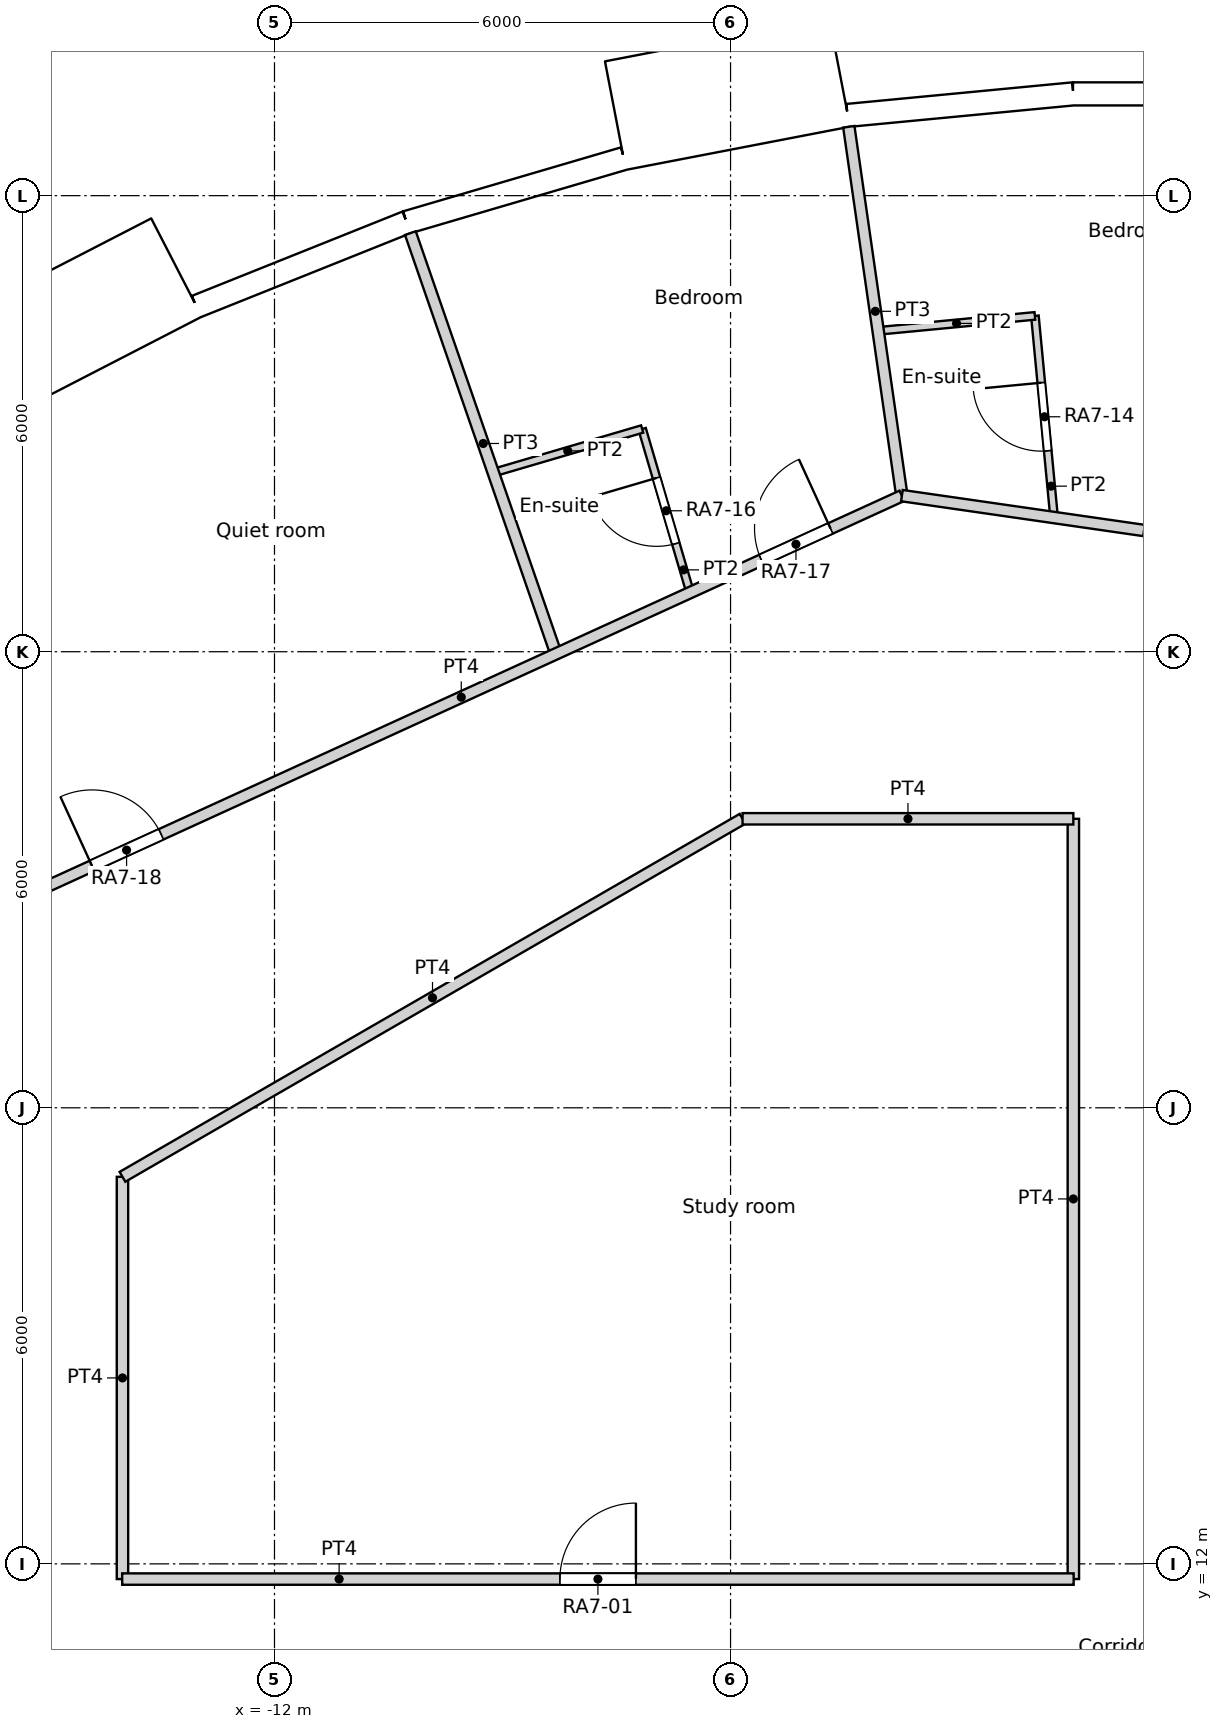
"""IFC4 building model, lengths in metres.
Left out: names, types, materials, properties, quantities, classifications, styles, units other than length and angle.
Written with IfcOpenShell. Run it as: python <this file> out.ifc"""

import sys

from ifc_helpers import new_model, si_unit, direction, frame, frame_2d, origin, origin_2d, place, context, subcontext, project, spatial, rectangle, circle, extrude, element, fill, save


model = new_model("IFC4")
c1 = context("Model", 3, precision=1e-05, world=origin(), true_north=direction((0.0, 1.0)))
c2 = subcontext(c1, "Body", "Model", "MODEL_VIEW")
j1 = project(units=[si_unit("LENGTHUNIT", "METRE"), si_unit("PLANEANGLEUNIT", "RADIAN")], contexts=[c1])
p1 = place(None, origin())
s1 = spatial("IfcSite", under=j1, at=p1, CompositionType="ELEMENT")
p2 = place(p1, origin())
s2 = spatial("IfcBuilding", under=s1, at=p2, CompositionType="ELEMENT")
p3 = place(p2, frame((0.0, 0.0, 93.0)))
s3 = spatial("IfcBuildingStorey", under=s2, at=p3, CompositionType="ELEMENT", Elevation=93.0)
for number, where, z_axis, x_axis in (
    (1, (-4.309, 29.966, 0.0), (0.0, 0.0, 1.0), (1.0, 0.0, 0.0)),
    (2, (-9.902, 28.61, 0.0), (0.0, 0.0, 1.0), (1.0, 0.0, 0.0)),
    (3, (-15.137, 26.219, 0.0), (0.0, 0.0, 1.0), (1.0, 0.0, 0.0)),
):
    element("IfcColumn", number, at=place(p3, frame(where, z_axis=z_axis, x_axis=x_axis)), inside=s3, PredefinedType="COLUMN", context=c2, shape_type="SweptSolid", body=[
        extrude(circle(Radius=0.6, at=origin_2d()), origin(), (0.0, 0.0, 1.0), 3.6),
    ])
for number, where, z_axis, x_axis in (
    (4, (-1.427, 24.506, 0.0), (0.0, 0.0, 1.0), (1.0, 0.0, 0.0)),
    (5, (-7.04, 23.516, 0.0), (0.0, 0.0, 1.0), (1.0, 0.0, 0.0)),
    (6, (-12.274, 21.259, 0.0), (0.0, 0.0, 1.0), (1.0, 0.0, 0.0)),
):
    element("IfcColumn", number, at=place(p3, frame(where, z_axis=z_axis, x_axis=x_axis)), inside=s3, PredefinedType="COLUMN", context=c2, shape_type="SweptSolid", body=[
        extrude(circle(Radius=0.65, at=origin_2d()), origin(), (0.0, 0.0, 1.0), 3.6),
    ])
for number, where, z_axis, x_axis in (
    (7, (-4.188, 18.35, 0.0), (0.0, 0.0, 1.0), (1.0, 0.0, 0.0)),
    (8, (-9.411, 16.301, 0.0), (0.0, 0.0, 1.0), (1.0, 0.0, 0.0)),
    (9, (-13.798, 12.802, 0.0), (0.0, 0.0, 1.0), (1.0, 0.0, 0.0)),
):
    element("IfcColumn", number, at=place(p3, frame(where, z_axis=z_axis, x_axis=x_axis)), inside=s3, PredefinedType="COLUMN", context=c2, shape_type="SweptSolid", body=[
        extrude(circle(Radius=0.7, at=origin_2d()), origin(), (0.0, 0.0, 1.0), 3.6),
    ])
p4 = place(p3, frame((1.487, 31.339, 0.0), z_axis=(0.0, 0.0, 1.0), x_axis=(-1.0, 0.0, 0.0)))
e10 = element("IfcWall", 10, at=p4, inside=s3, PredefinedType="SOLIDWALL", context=c2, shape_type="SweptSolid", body=[
    extrude(rectangle(XDim=2.98, YDim=0.3, at=frame_2d((1.49, 0.0))), origin(), (0.0, 0.0, 1.0), 3.15),
])
p5 = place(p4, frame((1.49, 0.0, 1.55)))
e11 = element("IfcOpeningElement", 11, at=p5, cuts=e10, PredefinedType="OPENING", context=c2, shape_type="SweptSolid", body=[
    extrude(circle(Radius=0.9, at=origin_2d()), frame((0.0, 0.16, 0.0), z_axis=(0.0, -1.0, 0.0), x_axis=(1.0, 0.0, 0.0)), (0.0, 0.0, 1.0), 0.32),
])
p6 = place(p3, frame((-1.493, 31.339, 0.0), z_axis=(0.0, 0.0, 1.0), x_axis=(-0.995472611385, -0.095048829468, 0.0)))
e12 = element("IfcWall", 12, at=p6, inside=s3, PredefinedType="SOLIDWALL", context=c2, shape_type="SweptSolid", body=[
    extrude(rectangle(XDim=2.979, YDim=0.3, at=frame_2d((1.49, 0.0))), origin(), (0.0, 0.0, 1.0), 3.15),
])
p7 = place(p6, frame((1.49, 0.0, 1.55)))
e13 = element("IfcOpeningElement", 13, at=p7, cuts=e12, PredefinedType="OPENING", context=c2, shape_type="SweptSolid", body=[
    extrude(circle(Radius=0.9, at=origin_2d()), frame((0.0, 0.16, 0.0), z_axis=(0.0, -1.0, 0.0), x_axis=(1.0, 0.0, 0.0)), (0.0, 0.0, 1.0), 0.32),
])
p8 = place(p3, frame((-4.567, 31.621, -0.45), z_axis=(0.0, 0.0, 1.0), x_axis=(-0.981921602273, -0.189288052949, 0.0)))
e14 = element("IfcWall", 14, at=p8, inside=s3, PredefinedType="ELEMENTEDWALL", context=c2, shape_type="SweptSolid", body=[
    extrude(rectangle(XDim=3.0, YDim=1.45, at=frame_2d((1.5, 0.0))), origin(), (0.0, 0.0, 1.0), 3.6),
])
p9 = place(p8, frame((1.5, 0.0, 2.0)))
e15 = element("IfcOpeningElement", 15, at=p9, cuts=e14, PredefinedType="OPENING", context=c2, shape_type="SweptSolid", body=[
    extrude(circle(Radius=0.9, at=origin_2d()), frame((0.0, 0.735, 0.0), z_axis=(0.0, -1.0, 0.0), x_axis=(1.0, 0.0, 0.0)), (0.0, 0.0, 1.0), 1.47),
])
p10 = place(p3, frame((-7.403, 30.488, 0.0), z_axis=(0.0, 0.0, 1.0), x_axis=(-0.959501085144, -0.281704930036, 0.0)))
e16 = element("IfcWall", 16, at=p10, inside=s3, PredefinedType="SOLIDWALL", context=c2, shape_type="SweptSolid", body=[
    extrude(rectangle(XDim=2.979, YDim=0.3, at=frame_2d((1.49, 0.0))), origin(), (0.0, 0.0, 1.0), 3.15),
])
p11 = place(p10, frame((1.49, 0.0, 1.55)))
e17 = element("IfcOpeningElement", 17, at=p11, cuts=e16, PredefinedType="OPENING", context=c2, shape_type="SweptSolid", body=[
    extrude(circle(Radius=0.9, at=origin_2d()), frame((0.0, 0.16, 0.0), z_axis=(0.0, -1.0, 0.0), x_axis=(1.0, 0.0, 0.0)), (0.0, 0.0, 1.0), 0.32),
])
p12 = place(p3, frame((-10.261, 29.649, 0.0), z_axis=(0.0, 0.0, 1.0), x_axis=(-0.928374947, -0.371644935098, 0.0)))
e18 = element("IfcWall", 18, at=p12, inside=s3, PredefinedType="SOLIDWALL", context=c2, shape_type="SweptSolid", body=[
    extrude(rectangle(XDim=2.98, YDim=0.3, at=frame_2d((1.49, 0.0))), origin(), (0.0, 0.0, 1.0), 3.15),
])
p13 = place(p12, frame((1.49, 0.0, 1.55)))
e19 = element("IfcOpeningElement", 19, at=p13, cuts=e18, PredefinedType="OPENING", context=c2, shape_type="SweptSolid", body=[
    extrude(circle(Radius=0.9, at=origin_2d()), frame((0.0, 0.16, 0.0), z_axis=(0.0, -1.0, 0.0), x_axis=(1.0, 0.0, 0.0)), (0.0, 0.0, 1.0), 0.32),
])
p14 = place(p3, frame((-13.291, 29.053, -0.45), z_axis=(0.0, 0.0, 1.0), x_axis=(-0.888858064689, -0.458182650083, 0.0)))
e20 = element("IfcWall", 20, at=p14, inside=s3, PredefinedType="ELEMENTEDWALL", context=c2, shape_type="SweptSolid", body=[
    extrude(rectangle(XDim=3.0, YDim=1.45, at=frame_2d((1.5, 0.0))), origin(), (0.0, 0.0, 1.0), 3.6),
])
p15 = place(p14, frame((1.5, 0.0, 2.0)))
e21 = element("IfcOpeningElement", 21, at=p15, cuts=e20, PredefinedType="OPENING", context=c2, shape_type="SweptSolid", body=[
    extrude(circle(Radius=0.9, at=origin_2d()), frame((0.0, 0.735, 0.0), z_axis=(0.0, -1.0, 0.0), x_axis=(1.0, 0.0, 0.0)), (0.0, 0.0, 1.0), 1.47),
])
p16 = place(p3, frame((-14.004, 11.8, 0.0), z_axis=(0.0, 0.0, 1.0), x_axis=(1.0, 0.0, 0.0)))
e22 = element("IfcWall", 22, at=p16, inside=s3, PredefinedType="PARTITIONING", context=c2, shape_type="SweptSolid", body=[
    extrude(rectangle(XDim=12.518, YDim=0.15, at=frame_2d((6.259, 0.0))), origin(), (0.0, 0.0, 1.0), 3.15),
])
p17 = place(p16, frame((5.759, 0.0, 0.0)))
e23 = element("IfcOpeningElement", 23, at=p17, cuts=e22, PredefinedType="OPENING", context=c2, shape_type="SweptSolid", body=[
    extrude(rectangle(XDim=1.0, YDim=2.04, at=frame_2d((0.5, 1.02))), frame((0.0, 0.075, 0.0), z_axis=(0.0, -1.0, 0.0), x_axis=(1.0, 0.0, 0.0)), (0.0, 0.0, 1.0), 0.15),
])
p18 = place(p3, frame((-1.49, 11.8, 0.0), z_axis=(0.0, 0.0, 1.0), x_axis=(0.0, 1.0, 0.0)))
e24 = element("IfcWall", 24, at=p18, inside=s3, PredefinedType="PARTITIONING", context=c2, shape_type="SweptSolid", body=[
    extrude(rectangle(XDim=10.002, YDim=0.15, at=frame_2d((5.001, 0.0))), origin(), (0.0, 0.0, 1.0), 3.15),
])
p19 = place(p3, frame((-5.842, 21.802, 0.0), z_axis=(0.0, 0.0, 1.0), x_axis=(1.0, 0.0, 0.0)))
e25 = element("IfcWall", 25, at=p19, inside=s3, PredefinedType="PARTITIONING", context=c2, shape_type="SweptSolid", body=[
    extrude(rectangle(XDim=4.352, YDim=0.15, at=frame_2d((2.176, 0.0))), origin(), (0.0, 0.0, 1.0), 3.15),
])
p20 = place(p3, frame((-14.0, 17.092, 0.0), z_axis=(0.0, 0.0, 1.0), x_axis=(0.86602719091, 0.499996904595, 0.0)))
e26 = element("IfcWall", 26, at=p20, inside=s3, PredefinedType="PARTITIONING", context=c2, shape_type="SweptSolid", body=[
    extrude(rectangle(XDim=9.42, YDim=0.15, at=frame_2d((4.71, 0.0))), origin(), (0.0, 0.0, 1.0), 3.15),
])
p21 = place(p3, frame((-14.0, 11.8, 0.0), z_axis=(0.0, 0.0, 1.0), x_axis=(0.0, 1.0, 0.0)))
e27 = element("IfcWall", 27, at=p21, inside=s3, PredefinedType="PARTITIONING", context=c2, shape_type="SweptSolid", body=[
    extrude(rectangle(XDim=5.292, YDim=0.15, at=frame_2d((2.646, 0.0))), origin(), (0.0, 0.0, 1.0), 3.15),
])
p22 = place(p3, frame((-3.746, 26.054, 0.0), z_axis=(0.0, 0.0, 1.0), x_axis=(0.989780545379, -0.142598990138, 0.0)))
e28 = element("IfcWall", 28, at=p22, inside=s3, PredefinedType="PARTITIONING", context=c2, shape_type="SweptSolid", body=[
    extrude(rectangle(XDim=14.83, YDim=0.15, at=frame_2d((7.415, 0.0))), origin(), (0.0, 0.0, 1.0), 3.15),
])
p23 = place(p22, frame((10.817, 0.0, 0.0)))
e29 = element("IfcOpeningElement", 29, at=p23, cuts=e28, PredefinedType="OPENING", context=c2, shape_type="SweptSolid", body=[
    extrude(rectangle(XDim=1.0, YDim=2.1, at=frame_2d((0.5, 1.05))), frame((0.0, 0.075, 0.0), z_axis=(0.0, -1.0, 0.0), x_axis=(1.0, 0.0, 0.0)), (0.0, 0.0, 1.0), 0.15),
])
p24 = place(p22, frame((5.954, 0.0, 0.0)))
e30 = element("IfcOpeningElement", 30, at=p24, cuts=e28, PredefinedType="OPENING", context=c2, shape_type="SweptSolid", body=[
    extrude(rectangle(XDim=1.0, YDim=2.1, at=frame_2d((0.5, 1.05))), frame((0.0, 0.075, 0.0), z_axis=(0.0, -1.0, 0.0), x_axis=(1.0, 0.0, 0.0)), (0.0, 0.0, 1.0), 0.15),
])
p25 = place(p22, frame((3.214, 0.0, 0.0)))
e31 = element("IfcOpeningElement", 31, at=p25, cuts=e28, PredefinedType="OPENING", context=c2, shape_type="SweptSolid", body=[
    extrude(rectangle(XDim=1.0, YDim=2.1, at=frame_2d((0.5, 1.05))), frame((0.0, 0.075, 0.0), z_axis=(0.0, -1.0, 0.0), x_axis=(1.0, 0.0, 0.0)), (0.0, 0.0, 1.0), 0.15),
])
p26 = place(p3, frame((-17.234, 19.888, 0.0), z_axis=(0.0, 0.0, 1.0), x_axis=(0.90953867323, 0.415619299238, 0.0)))
e32 = element("IfcWall", 32, at=p26, inside=s3, PredefinedType="PARTITIONING", context=c2, shape_type="SweptSolid", body=[
    extrude(rectangle(XDim=14.829, YDim=0.15, at=frame_2d((7.415, 0.0))), origin(), (0.0, 0.0, 1.0), 3.15),
])
p27 = place(p26, frame((12.797, 0.0, 0.0)))
e33 = element("IfcOpeningElement", 33, at=p27, cuts=e32, PredefinedType="OPENING", context=c2, shape_type="SweptSolid", body=[
    extrude(rectangle(XDim=1.0, YDim=2.1, at=frame_2d((0.5, 1.05))), frame((0.0, 0.075, 0.0), z_axis=(0.0, -1.0, 0.0), x_axis=(1.0, 0.0, 0.0)), (0.0, 0.0, 1.0), 0.15),
])
p28 = place(p26, frame((3.115, 0.0, 0.0)))
e34 = element("IfcOpeningElement", 34, at=p28, cuts=e32, PredefinedType="OPENING", context=c2, shape_type="SweptSolid", body=[
    extrude(rectangle(XDim=1.0, YDim=2.04, at=frame_2d((0.5, 1.02))), frame((0.0, 0.075, 0.0), z_axis=(0.0, -1.0, 0.0), x_axis=(1.0, 0.0, 0.0)), (0.0, 0.0, 1.0), 0.15),
])
p29 = place(p3, frame((-1.996, 28.418, 0.0), z_axis=(0.0, 0.0, 1.0), x_axis=(0.094925726797, -0.995484357683, 0.0)))
e35 = element("IfcWall", 35, at=p29, inside=s3, PredefinedType="PARTITIONING", context=c2, shape_type="SweptSolid", body=[
    extrude(rectangle(XDim=2.667, YDim=0.1, at=frame_2d((1.333, 0.0))), origin(), (0.0, 0.0, 1.0), 3.15),
])
p30 = place(p29, frame((0.883, 0.0, 0.0)))
e36 = element("IfcOpeningElement", 36, at=p30, cuts=e35, PredefinedType="OPENING", context=c2, shape_type="SweptSolid", body=[
    extrude(rectangle(XDim=0.9, YDim=2.04, at=frame_2d((0.45, 1.02))), frame((0.0, 0.05, 0.0), z_axis=(0.0, -1.0, 0.0), x_axis=(1.0, 0.0, 0.0)), (0.0, 0.0, 1.0), 0.1),
])
p31 = place(p3, frame((-4.058, 28.221, 0.0), z_axis=(0.0, 0.0, 1.0), x_axis=(0.995466291052, 0.095115000814, 0.0)))
e37 = element("IfcWall", 37, at=p31, inside=s3, PredefinedType="PARTITIONING", context=c2, shape_type="SweptSolid", body=[
    extrude(rectangle(XDim=2.071, YDim=0.1, at=frame_2d((1.036, 0.0))), origin(), (0.0, 0.0, 1.0), 3.15),
])
p32 = place(p3, frame((-4.444, 30.906, 0.0), z_axis=(0.0, 0.0, 1.0), x_axis=(0.142306296561, -0.989822669956, 0.0)))
e38 = element("IfcWall", 38, at=p32, inside=s3, PredefinedType="PARTITIONING", context=c2, shape_type="SweptSolid", body=[
    extrude(rectangle(XDim=4.905, YDim=0.15, at=frame_2d((2.452, 0.0))), origin(), (0.0, 0.0, 1.0), 3.15),
])
p33 = place(p3, frame((-7.163, 26.93, 0.0), z_axis=(0.0, 0.0, 1.0), x_axis=(0.281948165188, -0.959429638977, 0.0)))
e39 = element("IfcWall", 39, at=p33, inside=s3, PredefinedType="PARTITIONING", context=c2, shape_type="SweptSolid", body=[
    extrude(rectangle(XDim=2.242, YDim=0.1, at=frame_2d((1.121, 0.0))), origin(), (0.0, 0.0, 1.0), 3.15),
])
p34 = place(p33, frame((0.671, 0.0, 0.0)))
e40 = element("IfcOpeningElement", 40, at=p34, cuts=e39, PredefinedType="OPENING", context=c2, shape_type="SweptSolid", body=[
    extrude(rectangle(XDim=0.9, YDim=2.04, at=frame_2d((0.45, 1.02))), frame((0.0, 0.05, 0.0), z_axis=(0.0, -1.0, 0.0), x_axis=(1.0, 0.0, 0.0)), (0.0, 0.0, 1.0), 0.1),
])
p35 = place(p3, frame((-9.121, 26.355, 0.0), z_axis=(0.0, 0.0, 1.0), x_axis=(0.95948923736, 0.281745281045, 0.0)))
e41 = element("IfcWall", 41, at=p35, inside=s3, PredefinedType="PARTITIONING", context=c2, shape_type="SweptSolid", body=[
    extrude(rectangle(XDim=2.041, YDim=0.1, at=frame_2d((1.021, 0.0))), origin(), (0.0, 0.0, 1.0), 3.15),
])
p36 = place(p3, frame((-10.212, 29.507, 0.0), z_axis=(0.0, 0.0, 1.0), x_axis=(0.327061884856, -0.945002922469, 0.0)))
e42 = element("IfcWall", 42, at=p36, inside=s3, PredefinedType="PARTITIONING", context=c2, shape_type="SweptSolid", body=[
    extrude(rectangle(XDim=5.857, YDim=0.15, at=frame_2d((2.928, 0.0))), origin(), (0.0, 0.0, 1.0), 3.15),
])
p37 = place(p5, origin())
e43 = element("IfcWindow", 43, at=p37, inside=s3, PartitioningType="SINGLE_PANEL", PredefinedType="WINDOW", context=c2, shape_type="SweptSolid", body=[
    extrude(circle(Radius=0.9, at=origin_2d()), frame((0.0, 0.12, 0.0), z_axis=(0.0, -1.0, 0.0), x_axis=(1.0, 0.0, 0.0)), (0.0, 0.0, 1.0), 0.1),
])
fill(e11, e43)
p38 = place(p7, origin())
e44 = element("IfcWindow", 44, at=p38, inside=s3, PartitioningType="SINGLE_PANEL", PredefinedType="WINDOW", context=c2, shape_type="SweptSolid", body=[
    extrude(circle(Radius=0.9, at=origin_2d()), frame((0.0, 0.12, 0.0), z_axis=(0.0, -1.0, 0.0), x_axis=(1.0, 0.0, 0.0)), (0.0, 0.0, 1.0), 0.1),
])
fill(e13, e44)
p39 = place(p9, origin())
e45 = element("IfcWindow", 45, at=p39, inside=s3, PartitioningType="SINGLE_PANEL", PredefinedType="WINDOW", context=c2, shape_type="SweptSolid", body=[
    extrude(circle(Radius=0.9, at=origin_2d()), frame((0.0, 0.695, 0.0), z_axis=(0.0, -1.0, 0.0), x_axis=(1.0, 0.0, 0.0)), (0.0, 0.0, 1.0), 0.1),
])
fill(e15, e45)
p40 = place(p11, origin())
e46 = element("IfcWindow", 46, at=p40, inside=s3, PartitioningType="SINGLE_PANEL", PredefinedType="WINDOW", context=c2, shape_type="SweptSolid", body=[
    extrude(circle(Radius=0.9, at=origin_2d()), frame((0.0, 0.12, 0.0), z_axis=(0.0, -1.0, 0.0), x_axis=(1.0, 0.0, 0.0)), (0.0, 0.0, 1.0), 0.1),
])
fill(e17, e46)
p41 = place(p13, origin())
e47 = element("IfcWindow", 47, at=p41, inside=s3, PartitioningType="SINGLE_PANEL", PredefinedType="WINDOW", context=c2, shape_type="SweptSolid", body=[
    extrude(circle(Radius=0.9, at=origin_2d()), frame((0.0, 0.12, 0.0), z_axis=(0.0, -1.0, 0.0), x_axis=(1.0, 0.0, 0.0)), (0.0, 0.0, 1.0), 0.1),
])
fill(e19, e47)
p42 = place(p15, origin())
e48 = element("IfcWindow", 48, at=p42, inside=s3, PartitioningType="SINGLE_PANEL", PredefinedType="WINDOW", context=c2, shape_type="SweptSolid", body=[
    extrude(circle(Radius=0.9, at=origin_2d()), frame((0.0, 0.695, 0.0), z_axis=(0.0, -1.0, 0.0), x_axis=(1.0, 0.0, 0.0)), (0.0, 0.0, 1.0), 0.1),
])
fill(e21, e48)
p43 = place(p17, origin())
e49 = element("IfcDoor", 49, at=p43, inside=s3, OperationType="SINGLE_SWING_RIGHT", PredefinedType="DOOR", context=c2, shape_type="SweptSolid", body=[
    extrude(rectangle(XDim=1.0, YDim=2.04, at=frame_2d((0.5, 1.02))), frame((0.0, 0.025, 0.0), z_axis=(0.0, -1.0, 0.0), x_axis=(1.0, 0.0, 0.0)), (0.0, 0.0, 1.0), 0.05),
])
fill(e23, e49)
p44 = place(p30, origin())
e50 = element("IfcDoor", 50, at=p44, inside=s3, OperationType="SINGLE_SWING_RIGHT", PredefinedType="DOOR", context=c2, shape_type="SweptSolid", body=[
    extrude(rectangle(XDim=0.9, YDim=2.04, at=frame_2d((0.45, 1.02))), frame((0.0, 0.025, 0.0), z_axis=(0.0, -1.0, 0.0), x_axis=(1.0, 0.0, 0.0)), (0.0, 0.0, 1.0), 0.05),
])
fill(e36, e50)
p45 = place(p25, origin())
e51 = element("IfcDoor", 51, at=p45, inside=s3, OperationType="SINGLE_SWING_RIGHT", PredefinedType="DOOR", context=c2, shape_type="SweptSolid", body=[
    extrude(rectangle(XDim=1.0, YDim=2.1, at=frame_2d((0.5, 1.05))), frame((0.0, 0.025, 0.0), z_axis=(0.0, -1.0, 0.0), x_axis=(1.0, 0.0, 0.0)), (0.0, 0.0, 1.0), 0.05),
])
fill(e31, e51)
p46 = place(p34, origin())
e52 = element("IfcDoor", 52, at=p46, inside=s3, OperationType="SINGLE_SWING_RIGHT", PredefinedType="DOOR", context=c2, shape_type="SweptSolid", body=[
    extrude(rectangle(XDim=0.9, YDim=2.04, at=frame_2d((0.45, 1.02))), frame((0.0, 0.025, 0.0), z_axis=(0.0, -1.0, 0.0), x_axis=(1.0, 0.0, 0.0)), (0.0, 0.0, 1.0), 0.05),
])
fill(e40, e52)
p47 = place(p27, origin())
e53 = element("IfcDoor", 53, at=p47, inside=s3, OperationType="SINGLE_SWING_RIGHT", PredefinedType="DOOR", context=c2, shape_type="SweptSolid", body=[
    extrude(rectangle(XDim=1.0, YDim=2.1, at=frame_2d((0.5, 1.05))), frame((0.0, 0.025, 0.0), z_axis=(0.0, -1.0, 0.0), x_axis=(1.0, 0.0, 0.0)), (0.0, 0.0, 1.0), 0.05),
])
fill(e33, e53)
p48 = place(p28, origin())
e54 = element("IfcDoor", 54, at=p48, inside=s3, OperationType="SINGLE_SWING_LEFT", PredefinedType="DOOR", context=c2, shape_type="SweptSolid", body=[
    extrude(rectangle(XDim=1.0, YDim=2.04, at=frame_2d((0.5, 1.02))), frame((0.0, 0.025, 0.0), z_axis=(0.0, -1.0, 0.0), x_axis=(1.0, 0.0, 0.0)), (0.0, 0.0, 1.0), 0.05),
])
fill(e34, e54)
save(model, sys.argv[1])
